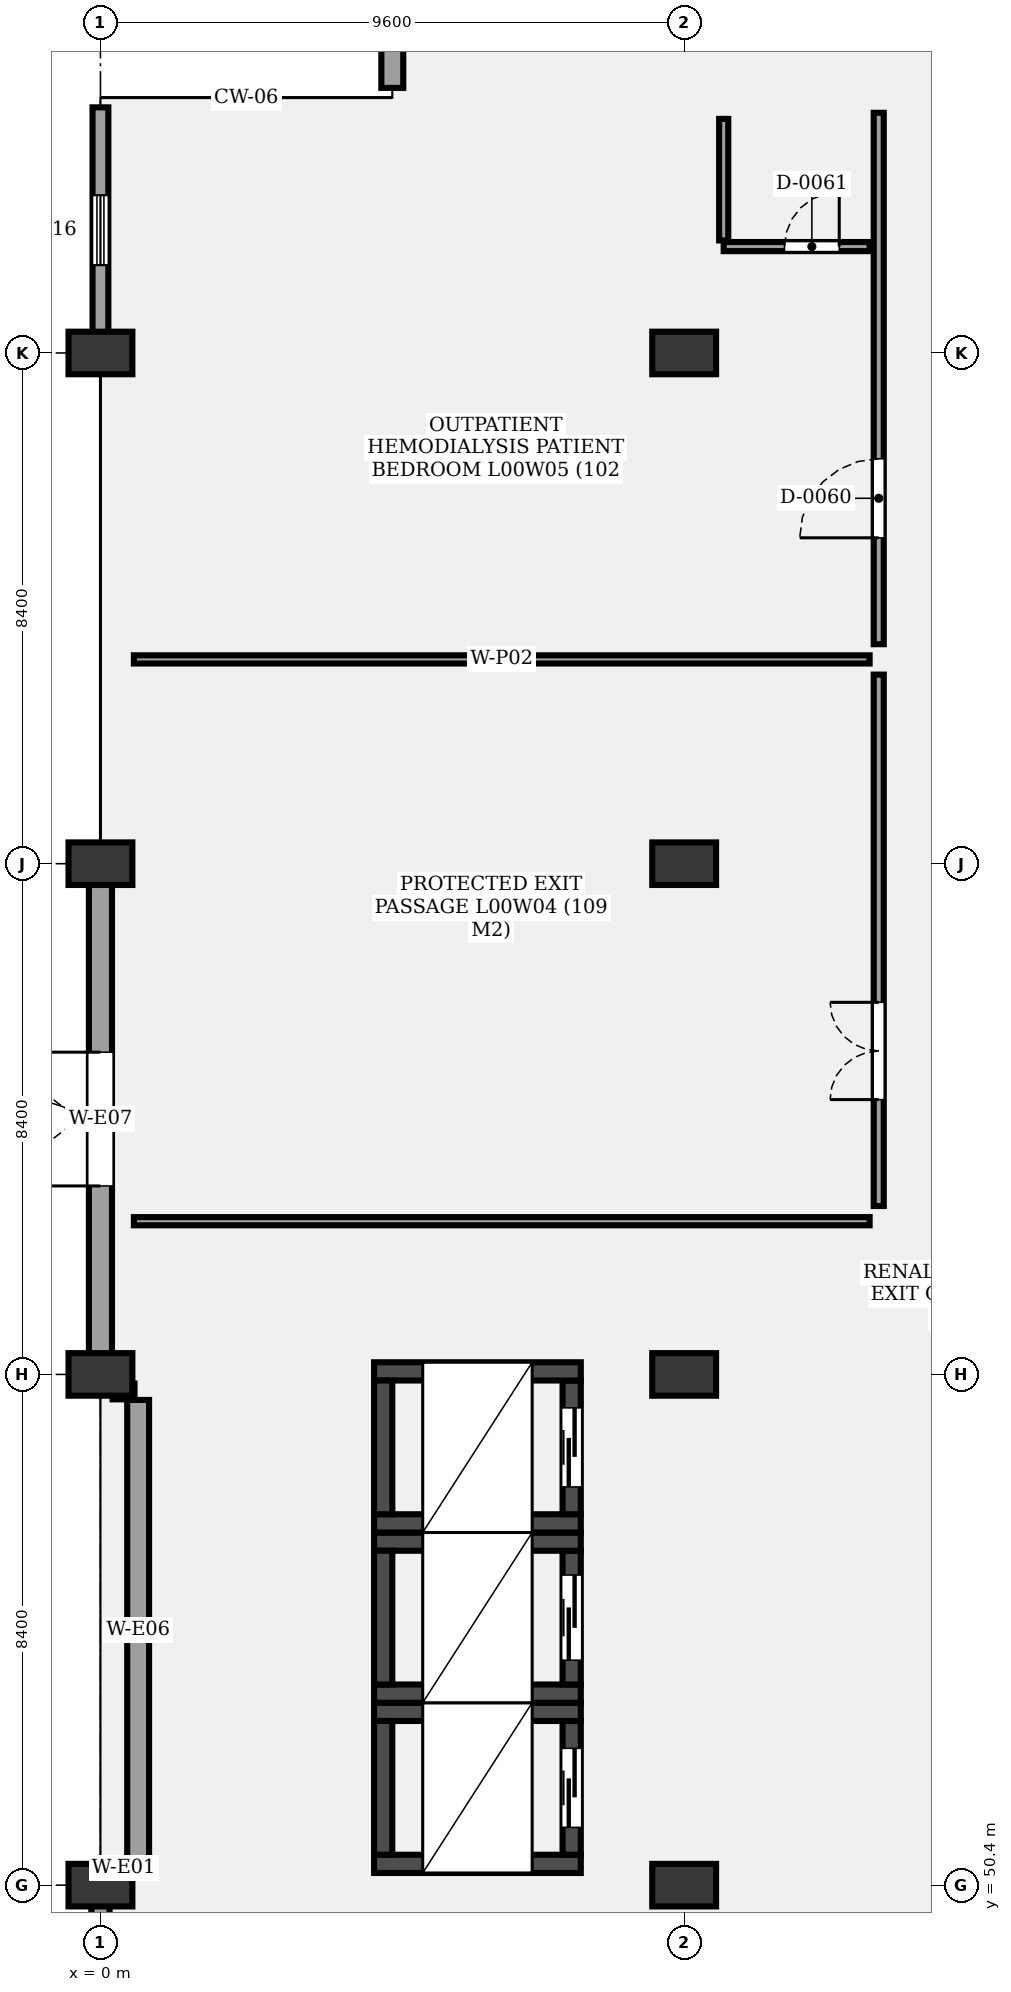
"""IFC4 building model, lengths in metres.
Left out: names, types, materials, properties, quantities, classifications, styles, units other than length and angle.
Written with IfcOpenShell. Run it as: python <this file> out.ifc"""

import sys

from ifc_helpers import new_model, si_unit, direction, frame, frame_2d, origin, origin_2d, place, context, subcontext, project, spatial, rectangle, extrude, element, fill, save


model = new_model("IFC4")
c1 = context("Model", 3, precision=1e-05, world=origin(), true_north=direction((0.0, 1.0)))
c2 = subcontext(c1, "Body", "Model", "MODEL_VIEW")
j1 = project(units=[si_unit("LENGTHUNIT", "METRE"), si_unit("PLANEANGLEUNIT", "RADIAN")], contexts=[c1])
p1 = place(None, origin())
s1 = spatial("IfcSite", under=j1, at=p1, CompositionType="ELEMENT")
p2 = place(p1, origin())
s2 = spatial("IfcBuilding", under=s1, at=p2, CompositionType="ELEMENT")
p3 = place(p2, origin())
s3 = spatial("IfcBuildingStorey", under=s2, at=p3, CompositionType="ELEMENT", Elevation=0.0)
for number, where, z_axis, x_axis in (
    (1, (0.0, 50.4, -0.35), (0.0, 0.0, 1.0), (1.0, 0.0, 0.0)),
    (2, (0.0, 58.8, -0.35), (0.0, 0.0, 1.0), (1.0, 0.0, 0.0)),
    (3, (0.0, 67.2, -0.35), (0.0, 0.0, 1.0), (1.0, 0.0, 0.0)),
    (4, (0.0, 75.6, -0.35), (0.0, 0.0, 1.0), (1.0, 0.0, 0.0)),
    (5, (9.6, 50.4, -0.35), (0.0, 0.0, 1.0), (1.0, 0.0, 0.0)),
    (6, (9.6, 58.8, -0.35), (0.0, 0.0, 1.0), (1.0, 0.0, 0.0)),
    (7, (9.6, 67.2, -0.35), (0.0, 0.0, 1.0), (1.0, 0.0, 0.0)),
    (8, (9.6, 75.6, -0.35), (0.0, 0.0, 1.0), (1.0, 0.0, 0.0)),
):
    element("IfcColumn", number, at=place(p3, frame(where, z_axis=z_axis, x_axis=x_axis)), inside=s3, PredefinedType="COLUMN", context=c2, shape_type="SweptSolid", body=[
        extrude(rectangle(XDim=1.05, YDim=0.7, at=origin_2d()), origin(), (0.0, 0.0, 1.0), 5.45),
    ])
p4 = place(p3, frame((4.5, 50.75, 0.0), z_axis=(0.0, 0.0, 1.0), x_axis=(1.0, 0.0, 0.0)))
e9 = element("IfcWall", 9, at=p4, inside=s3, PredefinedType="SHEAR", context=c2, shape_type="SweptSolid", body=[
    extrude(rectangle(XDim=3.4, YDim=0.3, at=frame_2d((1.7, 0.0))), origin(), (0.0, 0.0, 1.0), 5.1),
])
p5 = place(p3, frame((7.75, 50.9, 0.0), z_axis=(0.0, 0.0, 1.0), x_axis=(0.0, 1.0, 0.0)))
e10 = element("IfcWall", 10, at=p5, inside=s3, PredefinedType="SHEAR", context=c2, shape_type="SweptSolid", body=[
    extrude(rectangle(XDim=2.2, YDim=0.3, at=frame_2d((1.1, 0.0))), origin(), (0.0, 0.0, 1.0), 5.1),
])
p6 = place(p5, frame((0.45, 0.0, 0.0)))
e11 = element("IfcOpeningElement", 11, at=p6, cuts=e10, PredefinedType="OPENING", context=c2, shape_type="SweptSolid", body=[
    extrude(rectangle(XDim=1.3, YDim=2.3, at=frame_2d((0.65, 1.15))), frame((0.0, 0.16, 0.0), z_axis=(0.0, -1.0, 0.0), x_axis=(1.0, 0.0, 0.0)), (0.0, 0.0, 1.0), 0.32),
])
p7 = place(p3, frame((7.9, 53.25, 0.0), z_axis=(0.0, 0.0, 1.0), x_axis=(-1.0, 0.0, 0.0)))
e12 = element("IfcWall", 12, at=p7, inside=s3, PredefinedType="SHEAR", context=c2, shape_type="SweptSolid", body=[
    extrude(rectangle(XDim=3.4, YDim=0.3, at=frame_2d((1.7, 0.0))), origin(), (0.0, 0.0, 1.0), 5.1),
])
p8 = place(p3, frame((4.65, 53.1, 0.0), z_axis=(0.0, 0.0, 1.0), x_axis=(0.0, -1.0, 0.0)))
e13 = element("IfcWall", 13, at=p8, inside=s3, PredefinedType="SHEAR", context=c2, shape_type="SweptSolid", body=[
    extrude(rectangle(XDim=2.2, YDim=0.3, at=frame_2d((1.1, 0.0))), origin(), (0.0, 0.0, 1.0), 5.1),
])
p9 = place(p3, frame((4.5, 53.55, 0.0), z_axis=(0.0, 0.0, 1.0), x_axis=(1.0, 0.0, 0.0)))
e14 = element("IfcWall", 14, at=p9, inside=s3, PredefinedType="SHEAR", context=c2, shape_type="SweptSolid", body=[
    extrude(rectangle(XDim=3.4, YDim=0.3, at=frame_2d((1.7, 0.0))), origin(), (0.0, 0.0, 1.0), 5.1),
])
p10 = place(p3, frame((7.75, 53.7, 0.0), z_axis=(0.0, 0.0, 1.0), x_axis=(0.0, 1.0, 0.0)))
e15 = element("IfcWall", 15, at=p10, inside=s3, PredefinedType="SHEAR", context=c2, shape_type="SweptSolid", body=[
    extrude(rectangle(XDim=2.2, YDim=0.3, at=frame_2d((1.1, 0.0))), origin(), (0.0, 0.0, 1.0), 5.1),
])
p11 = place(p10, frame((0.4, 0.0, 0.0)))
e16 = element("IfcOpeningElement", 16, at=p11, cuts=e15, PredefinedType="OPENING", context=c2, shape_type="SweptSolid", body=[
    extrude(rectangle(XDim=1.4, YDim=2.3, at=frame_2d((0.7, 1.15))), frame((0.0, 0.16, 0.0), z_axis=(0.0, -1.0, 0.0), x_axis=(1.0, 0.0, 0.0)), (0.0, 0.0, 1.0), 0.32),
])
p12 = place(p3, frame((7.9, 56.05, 0.0), z_axis=(0.0, 0.0, 1.0), x_axis=(-1.0, 0.0, 0.0)))
e17 = element("IfcWall", 17, at=p12, inside=s3, PredefinedType="SHEAR", context=c2, shape_type="SweptSolid", body=[
    extrude(rectangle(XDim=3.4, YDim=0.3, at=frame_2d((1.7, 0.0))), origin(), (0.0, 0.0, 1.0), 5.1),
])
p13 = place(p3, frame((4.65, 55.9, 0.0), z_axis=(0.0, 0.0, 1.0), x_axis=(0.0, -1.0, 0.0)))
e18 = element("IfcWall", 18, at=p13, inside=s3, PredefinedType="SHEAR", context=c2, shape_type="SweptSolid", body=[
    extrude(rectangle(XDim=2.2, YDim=0.3, at=frame_2d((1.1, 0.0))), origin(), (0.0, 0.0, 1.0), 5.1),
])
p14 = place(p3, frame((4.5, 56.35, 0.0), z_axis=(0.0, 0.0, 1.0), x_axis=(1.0, 0.0, 0.0)))
e19 = element("IfcWall", 19, at=p14, inside=s3, PredefinedType="SHEAR", context=c2, shape_type="SweptSolid", body=[
    extrude(rectangle(XDim=3.4, YDim=0.3, at=frame_2d((1.7, 0.0))), origin(), (0.0, 0.0, 1.0), 5.1),
])
p15 = place(p3, frame((7.75, 56.5, 0.0), z_axis=(0.0, 0.0, 1.0), x_axis=(0.0, 1.0, 0.0)))
e20 = element("IfcWall", 20, at=p15, inside=s3, PredefinedType="SHEAR", context=c2, shape_type="SweptSolid", body=[
    extrude(rectangle(XDim=2.2, YDim=0.3, at=frame_2d((1.1, 0.0))), origin(), (0.0, 0.0, 1.0), 5.1),
])
p16 = place(p15, frame((0.45, 0.0, 0.0)))
e21 = element("IfcOpeningElement", 21, at=p16, cuts=e20, PredefinedType="OPENING", context=c2, shape_type="SweptSolid", body=[
    extrude(rectangle(XDim=1.3, YDim=2.3, at=frame_2d((0.65, 1.15))), frame((0.0, 0.16, 0.0), z_axis=(0.0, -1.0, 0.0), x_axis=(1.0, 0.0, 0.0)), (0.0, 0.0, 1.0), 0.32),
])
p17 = place(p3, frame((7.9, 58.85, 0.0), z_axis=(0.0, 0.0, 1.0), x_axis=(-1.0, 0.0, 0.0)))
e22 = element("IfcWall", 22, at=p17, inside=s3, PredefinedType="SHEAR", context=c2, shape_type="SweptSolid", body=[
    extrude(rectangle(XDim=3.4, YDim=0.3, at=frame_2d((1.7, 0.0))), origin(), (0.0, 0.0, 1.0), 5.1),
])
p18 = place(p3, frame((4.65, 58.7, 0.0), z_axis=(0.0, 0.0, 1.0), x_axis=(0.0, -1.0, 0.0)))
e23 = element("IfcWall", 23, at=p18, inside=s3, PredefinedType="SHEAR", context=c2, shape_type="SweptSolid", body=[
    extrude(rectangle(XDim=2.2, YDim=0.3, at=frame_2d((1.1, 0.0))), origin(), (0.0, 0.0, 1.0), 5.1),
])
p19 = place(p3, frame((0.0, 42.0, 0.0), z_axis=(0.0, 0.0, 1.0), x_axis=(0.0, 1.0, 0.0)))
e24 = element("IfcWall", 24, at=p19, inside=s3, PredefinedType="SOLIDWALL", context=c2, shape_type="SweptSolid", body=[
    extrude(rectangle(XDim=8.4, YDim=0.3, at=frame_2d((4.2, 0.0))), origin(), (0.0, 0.0, 1.0), 4.24),
])
p20 = place(p19, frame((3.1, 0.0, 0.0)))
e25 = element("IfcOpeningElement", 25, at=p20, cuts=e24, PredefinedType="OPENING", context=c2, shape_type="SweptSolid", body=[
    extrude(rectangle(XDim=2.2, YDim=2.5, at=frame_2d((1.1, 1.25))), frame((0.0, 0.16, 0.0), z_axis=(0.0, -1.0, 0.0), x_axis=(1.0, 0.0, 0.0)), (0.0, 0.0, 1.0), 0.32),
])
for number, where, z_axis, x_axis in (
    (26, (0.2, 50.68, 0.0), (0.0, 0.0, 1.0), (1.0, 0.0, 0.0)),
    (27, (0.2, 58.52, 0.0), (0.0, 0.0, 1.0), (1.0, 0.0, 0.0)),
):
    element("IfcWall", number, at=place(p3, frame(where, z_axis=z_axis, x_axis=x_axis)), inside=s3, PredefinedType="SOLIDWALL", context=c2, shape_type="SweptSolid", body=[
        extrude(rectangle(XDim=0.36, YDim=0.26, at=frame_2d((0.18, 0.0))), origin(), (0.0, 0.0, 1.0), 4.24),
    ])
p21 = place(p3, frame((0.62, 50.82, 0.0), z_axis=(0.0, 0.0, 1.0), x_axis=(0.0, 1.0, 0.0)))
e28 = element("IfcWall", 28, at=p21, inside=s3, PredefinedType="SOLIDWALL", context=c2, shape_type="SweptSolid", body=[
    extrude(rectangle(XDim=7.56, YDim=0.36, at=frame_2d((3.78, 0.0))), origin(), (0.0, 0.0, 1.0), 4.24),
])
p22 = place(p3, frame((0.0, 58.8, 0.0), z_axis=(0.0, 0.0, 1.0), x_axis=(0.0, 1.0, 0.0)))
e29 = element("IfcWall", 29, at=p22, inside=s3, PredefinedType="SOLIDWALL", context=c2, shape_type="SweptSolid", body=[
    extrude(rectangle(XDim=8.4, YDim=0.38, at=frame_2d((4.2, 0.0))), origin(), (0.0, 0.0, 1.0), 4.24),
])
p23 = place(p22, frame((3.1, 0.0, 0.0)))
e30 = element("IfcOpeningElement", 30, at=p23, cuts=e29, PredefinedType="OPENING", context=c2, shape_type="SweptSolid", body=[
    extrude(rectangle(XDim=2.2, YDim=2.5, at=frame_2d((1.1, 1.25))), frame((0.0, 0.2, 0.0), z_axis=(0.0, -1.0, 0.0), x_axis=(1.0, 0.0, 0.0)), (0.0, 0.0, 1.0), 0.4),
])
p24 = place(p3, frame((0.0, 75.6, 0.0), z_axis=(0.0, 0.0, 1.0), x_axis=(0.0, 1.0, 0.0)))
e31 = element("IfcWall", 31, at=p24, inside=s3, PredefinedType="SOLIDWALL", context=c2, shape_type="SweptSolid", body=[
    extrude(rectangle(XDim=4.04, YDim=0.26, at=frame_2d((2.02, 0.0))), origin(), (0.0, 0.0, 1.0), 4.24),
])
p25 = place(p24, frame((1.445, 0.0, 0.85)))
e32 = element("IfcOpeningElement", 32, at=p25, cuts=e31, PredefinedType="OPENING", context=c2, shape_type="SweptSolid", body=[
    extrude(rectangle(XDim=1.15, YDim=1.2, at=frame_2d((0.575, 0.6))), frame((0.0, 0.14, 0.0), z_axis=(0.0, -1.0, 0.0), x_axis=(1.0, 0.0, 0.0)), (0.0, 0.0, 1.0), 0.28),
])
p26 = place(p3, frame((4.8, 79.96, 0.0), z_axis=(0.0, 0.0, 1.0), x_axis=(0.0, 1.0, 0.0)))
e33 = element("IfcWall", 33, at=p26, inside=s3, PredefinedType="SOLIDWALL", context=c2, shape_type="SweptSolid", body=[
    extrude(rectangle(XDim=3.88, YDim=0.36, at=frame_2d((1.94, 0.0))), origin(), (0.0, 0.0, 1.0), 4.24),
])
p27 = place(p3, frame((12.8, 61.57, 0.0), z_axis=(0.0, 0.0, 1.0), x_axis=(0.0, 1.0, 0.0)))
e34 = element("IfcWall", 34, at=p27, inside=s3, PredefinedType="PARTITIONING", context=c2, shape_type="SweptSolid", body=[
    extrude(rectangle(XDim=8.74, YDim=0.165, at=frame_2d((4.37, 0.0))), origin(), (0.0, 0.0, 1.0), 3.98),
])
p28 = place(p27, frame((1.75, 0.0, 0.0)))
e35 = element("IfcOpeningElement", 35, at=p28, cuts=e34, PredefinedType="OPENING", context=c2, shape_type="SweptSolid", body=[
    extrude(rectangle(XDim=1.6, YDim=2.2, at=frame_2d((0.8, 1.1))), frame((0.0, 0.093, 0.0), z_axis=(0.0, -1.0, 0.0), x_axis=(1.0, 0.0, 0.0)), (0.0, 0.0, 1.0), 0.185),
])
p29 = place(p3, frame((0.55, 61.32, 0.0), z_axis=(0.0, 0.0, 1.0), x_axis=(1.0, 0.0, 0.0)))
e36 = element("IfcWall", 36, at=p29, inside=s3, PredefinedType="PARTITIONING", context=c2, shape_type="SweptSolid", body=[
    extrude(rectangle(XDim=12.1, YDim=0.135, at=frame_2d((6.05, 0.0))), origin(), (0.0, 0.0, 1.0), 3.98),
])
p30 = place(p3, frame((12.8, 70.81, 0.0), z_axis=(0.0, 0.0, 1.0), x_axis=(0.0, 1.0, 0.0)))
e37 = element("IfcWall", 37, at=p30, inside=s3, PredefinedType="PARTITIONING", context=c2, shape_type="SweptSolid", body=[
    extrude(rectangle(XDim=8.74, YDim=0.165, at=frame_2d((4.37, 0.0))), origin(), (0.0, 0.0, 1.0), 3.98),
])
p31 = place(p30, frame((1.75, 0.0, 0.0)))
e38 = element("IfcOpeningElement", 38, at=p31, cuts=e37, PredefinedType="OPENING", context=c2, shape_type="SweptSolid", body=[
    extrude(rectangle(XDim=1.3, YDim=2.2, at=frame_2d((0.65, 1.1))), frame((0.0, 0.093, 0.0), z_axis=(0.0, -1.0, 0.0), x_axis=(1.0, 0.0, 0.0)), (0.0, 0.0, 1.0), 0.185),
])
p32 = place(p3, frame((10.25, 77.35, 0.0), z_axis=(0.0, 0.0, 1.0), x_axis=(1.0, 0.0, 0.0)))
e39 = element("IfcWall", 39, at=p32, inside=s3, PredefinedType="PARTITIONING", context=c2, shape_type="SweptSolid", body=[
    extrude(rectangle(XDim=2.4, YDim=0.15, at=frame_2d((1.2, 0.0))), origin(), (0.0, 0.0, 1.0), 3.98),
])
p33 = place(p32, frame((1.0, 0.0, 0.0)))
e40 = element("IfcOpeningElement", 40, at=p33, cuts=e39, PredefinedType="OPENING", context=c2, shape_type="SweptSolid", body=[
    extrude(rectangle(XDim=0.9, YDim=2.1, at=frame_2d((0.45, 1.05))), frame((0.0, 0.085, 0.0), z_axis=(0.0, -1.0, 0.0), x_axis=(1.0, 0.0, 0.0)), (0.0, 0.0, 1.0), 0.17),
])
p34 = place(p3, frame((10.25, 77.45, 0.0), z_axis=(0.0, 0.0, 1.0), x_axis=(0.0, 1.0, 0.0)))
e41 = element("IfcWall", 41, at=p34, inside=s3, PredefinedType="PARTITIONING", context=c2, shape_type="SweptSolid", body=[
    extrude(rectangle(XDim=2.0, YDim=0.15, at=frame_2d((1.0, 0.0))), origin(), (0.0, 0.0, 1.0), 3.98),
])
p35 = place(p3, frame((0.55, 70.56, 0.0), z_axis=(0.0, 0.0, 1.0), x_axis=(1.0, 0.0, 0.0)))
e42 = element("IfcWall", 42, at=p35, inside=s3, PredefinedType="PARTITIONING", context=c2, shape_type="SweptSolid", body=[
    extrude(rectangle(XDim=12.1, YDim=0.135, at=frame_2d((6.05, 0.0))), origin(), (0.0, 0.0, 1.0), 3.98),
])
p36 = place(p6, origin())
e43 = element("IfcDoor", 43, at=p36, inside=s3, OperationType="SLIDING_TO_LEFT", PredefinedType="DOOR", context=c2, shape_type="SweptSolid", body=[
    extrude(rectangle(XDim=1.3, YDim=2.3, at=frame_2d((0.65, 1.15))), frame((0.0, 0.025, 0.0), z_axis=(0.0, -1.0, 0.0), x_axis=(1.0, 0.0, 0.0)), (0.0, 0.0, 1.0), 0.05),
])
fill(e11, e43)
p37 = place(p11, origin())
e44 = element("IfcDoor", 44, at=p37, inside=s3, OperationType="SLIDING_TO_RIGHT", PredefinedType="DOOR", context=c2, shape_type="SweptSolid", body=[
    extrude(rectangle(XDim=1.4, YDim=2.3, at=frame_2d((0.7, 1.15))), frame((0.0, 0.025, 0.0), z_axis=(0.0, -1.0, 0.0), x_axis=(1.0, 0.0, 0.0)), (0.0, 0.0, 1.0), 0.05),
])
fill(e16, e44)
p38 = place(p16, origin())
e45 = element("IfcDoor", 45, at=p38, inside=s3, OperationType="SLIDING_TO_LEFT", PredefinedType="DOOR", context=c2, shape_type="SweptSolid", body=[
    extrude(rectangle(XDim=1.3, YDim=2.3, at=frame_2d((0.65, 1.15))), frame((0.0, 0.025, 0.0), z_axis=(0.0, -1.0, 0.0), x_axis=(1.0, 0.0, 0.0)), (0.0, 0.0, 1.0), 0.05),
])
fill(e21, e45)
p39 = place(p23, origin())
e46 = element("IfcDoor", 46, at=p39, inside=s3, OperationType="DOUBLE_DOOR_SINGLE_SWING", PredefinedType="DOOR", context=c2, shape_type="SweptSolid", body=[
    extrude(rectangle(XDim=2.2, YDim=2.5, at=frame_2d((1.1, 1.25))), frame((0.0, 0.025, 0.0), z_axis=(0.0, -1.0, 0.0), x_axis=(1.0, 0.0, 0.0)), (0.0, 0.0, 1.0), 0.05),
])
fill(e30, e46)
p40 = place(p25, origin())
e47 = element("IfcWindow", 47, at=p40, inside=s3, PartitioningType="SINGLE_PANEL", PredefinedType="WINDOW", context=c2, shape_type="SweptSolid", body=[
    extrude(rectangle(XDim=1.15, YDim=1.2, at=frame_2d((0.575, 0.6))), frame((0.0, 0.03, 0.0), z_axis=(0.0, -1.0, 0.0), x_axis=(1.0, 0.0, 0.0)), (0.0, 0.0, 1.0), 0.06),
])
fill(e32, e47)
p41 = place(p28, origin())
e48 = element("IfcDoor", 48, at=p41, inside=s3, OperationType="DOUBLE_DOOR_SINGLE_SWING", PredefinedType="DOOR", context=c2, shape_type="SweptSolid", body=[
    extrude(rectangle(XDim=1.6, YDim=2.2, at=frame_2d((0.8, 1.1))), frame((0.0, 0.025, 0.0), z_axis=(0.0, -1.0, 0.0), x_axis=(1.0, 0.0, 0.0)), (0.0, 0.0, 1.0), 0.05),
])
fill(e35, e48)
p42 = place(p31, origin())
e49 = element("IfcDoor", 49, at=p42, inside=s3, OperationType="SINGLE_SWING_LEFT", PredefinedType="DOOR", context=c2, shape_type="SweptSolid", body=[
    extrude(rectangle(XDim=1.3, YDim=2.2, at=frame_2d((0.65, 1.1))), frame((0.0, 0.025, 0.0), z_axis=(0.0, -1.0, 0.0), x_axis=(1.0, 0.0, 0.0)), (0.0, 0.0, 1.0), 0.05),
])
fill(e38, e49)
p43 = place(p33, origin())
e50 = element("IfcDoor", 50, at=p43, inside=s3, OperationType="SINGLE_SWING_RIGHT", PredefinedType="DOOR", context=c2, shape_type="SweptSolid", body=[
    extrude(rectangle(XDim=0.9, YDim=2.1, at=frame_2d((0.45, 1.05))), frame((0.0, 0.025, 0.0), z_axis=(0.0, -1.0, 0.0), x_axis=(1.0, 0.0, 0.0)), (0.0, 0.0, 1.0), 0.05),
])
fill(e40, e50)
save(model, sys.argv[1])
